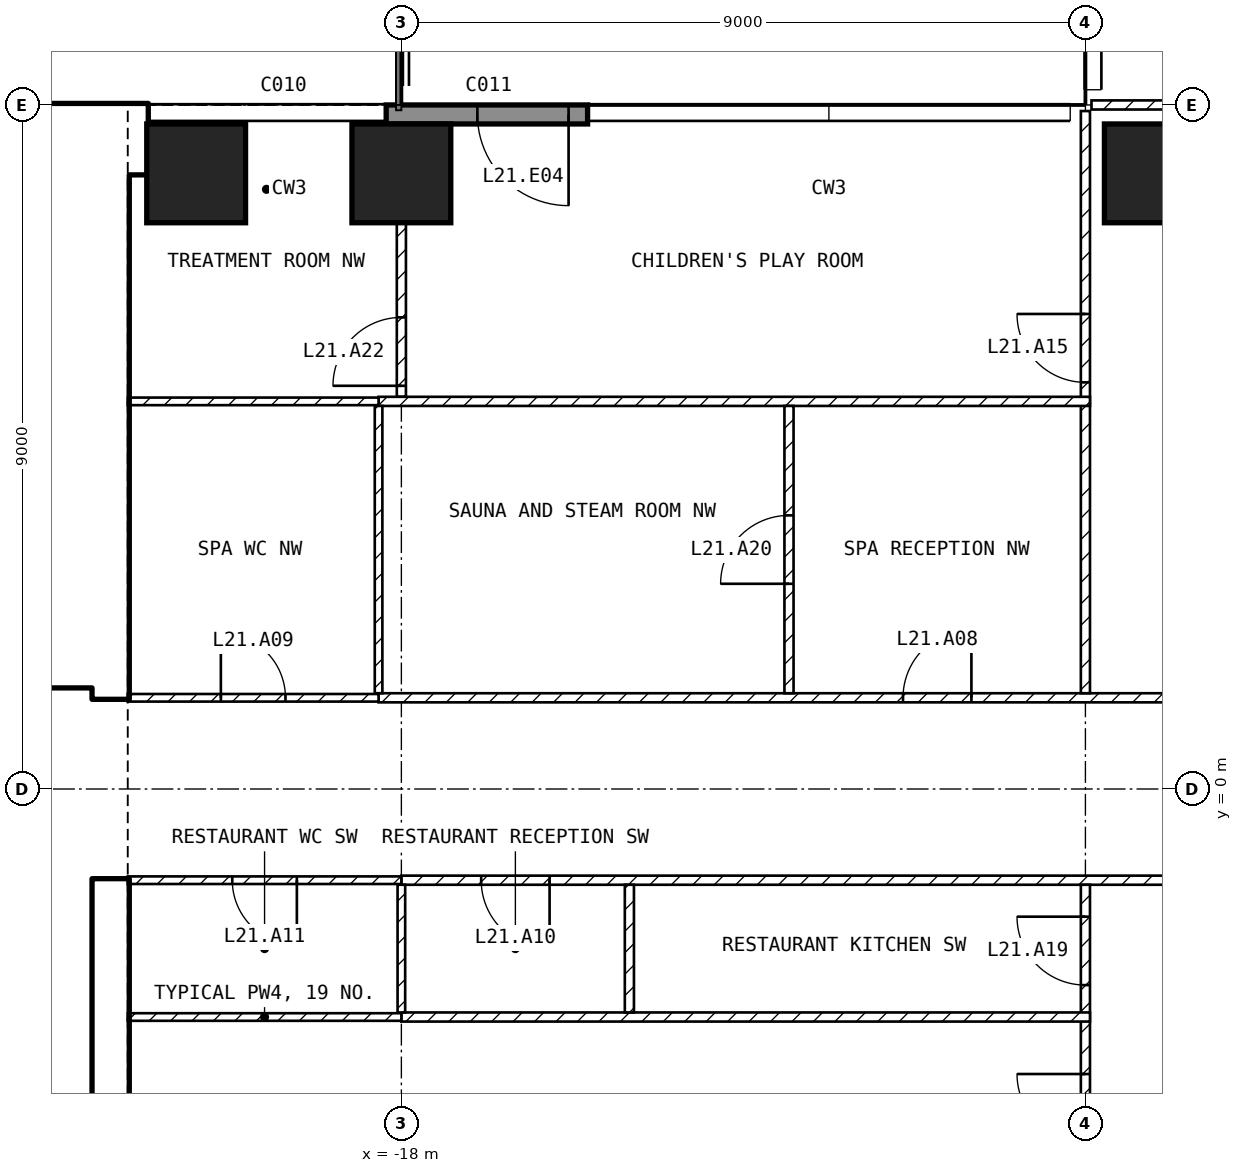
"""IFC4 building model, lengths in metres.
Left out: names, types, materials, properties, quantities, classifications, styles, units other than length and angle.
Written with IfcOpenShell. Run it as: python <this file> out.ifc"""

import sys

from ifc_helpers import new_model, si_unit, direction, frame, frame_2d, origin, origin_2d, place, context, subcontext, project, spatial, rectangle, extrude, element, fill, save


model = new_model("IFC4")
c1 = context("Model", 3, precision=1e-05, world=origin(), true_north=direction((0.0, 1.0)))
c2 = subcontext(c1, "Body", "Model", "MODEL_VIEW")
j1 = project(units=[si_unit("LENGTHUNIT", "METRE"), si_unit("PLANEANGLEUNIT", "RADIAN")], contexts=[c1])
p1 = place(None, origin())
s1 = spatial("IfcSite", under=j1, at=p1, CompositionType="ELEMENT")
p2 = place(p1, origin())
s2 = spatial("IfcBuilding", under=s1, at=p2, CompositionType="ELEMENT")
p3 = place(p2, frame((0.0, 0.0, 92.5)))
s3 = spatial("IfcBuildingStorey", under=s2, at=p3, CompositionType="ELEMENT", Elevation=92.5)
for number, where, z_axis, x_axis in (
    (1, (-20.7, 8.1, -0.3), (0.0, 0.0, 1.0), (1.0, 0.0, 0.0)),
    (2, (-18.0, 8.1, -0.3), (0.0, 0.0, 1.0), (1.0, 0.0, 0.0)),
    (3, (-8.1, 8.1, -0.3), (0.0, 0.0, 1.0), (1.0, 0.0, 0.0)),
):
    element("IfcColumn", number, at=place(p3, frame(where, z_axis=z_axis, x_axis=x_axis)), inside=s3, PredefinedType="COLUMN", context=c2, shape_type="SweptSolid", body=[
        extrude(rectangle(XDim=1.3, YDim=1.3, at=origin_2d()), origin(), (0.0, 0.0, 1.0), 5.25),
    ])
p4 = place(p3, frame((-15.55, 8.875, 0.0), z_axis=(0.0, 0.0, 1.0), x_axis=(-1.0, 0.0, 0.0)))
e4 = element("IfcWall", 4, at=p4, inside=s3, PredefinedType="SOLIDWALL", context=c2, shape_type="SweptSolid", body=[
    extrude(rectangle(XDim=2.65, YDim=0.25, at=frame_2d((1.325, 0.0))), origin(), (0.0, 0.0, 1.0), 4.95),
])
p5 = place(p4, frame((0.25, 0.0, 0.0)))
e5 = element("IfcOpeningElement", 5, at=p5, cuts=e4, PredefinedType="OPENING", context=c2, shape_type="SweptSolid", body=[
    extrude(rectangle(XDim=1.2, YDim=2.4, at=frame_2d((0.6, 1.2))), frame((0.0, 0.135, 0.0), z_axis=(0.0, -1.0, 0.0), x_axis=(1.0, 0.0, 0.0)), (0.0, 0.0, 1.0), 0.27),
])
p6 = place(p3, frame((-31.5, 8.55, 0.0), z_axis=(0.0, 0.0, 1.0), x_axis=(1.0, 0.0, 0.0)))
e6 = element("IfcWall", 6, at=p6, inside=s3, PredefinedType="SHEAR", context=c2, shape_type="SweptSolid", body=[
    extrude(rectangle(XDim=10.15, YDim=0.9, at=frame_2d((5.075, 0.0))), origin(), (0.0, 0.0, 1.0), 4.95),
])
for number, where, z_axis, x_axis in (
    (7, (-21.825, -8.1, 0.0), (0.0, 0.0, 1.0), (0.0, 1.0, 0.0)),
    (8, (-21.825, 1.2, 0.0), (0.0, 0.0, 1.0), (0.0, 1.0, 0.0)),
):
    element("IfcWall", number, at=place(p3, frame(where, z_axis=z_axis, x_axis=x_axis)), inside=s3, PredefinedType="SHEAR", context=c2, shape_type="SweptSolid", body=[
        extrude(rectangle(XDim=6.9, YDim=0.45, at=frame_2d((3.45, 0.0))), origin(), (0.0, 0.0, 1.0), 4.95),
    ])
p7 = place(p3, frame((-35.1, 1.45, 0.0), z_axis=(0.0, 0.0, 1.0), x_axis=(1.0, 0.0, 0.0)))
e9 = element("IfcWall", 9, at=p7, inside=s3, PredefinedType="SOLIDWALL", context=c2, shape_type="SweptSolid", body=[
    extrude(rectangle(XDim=13.05, YDim=0.2, at=frame_2d((6.525, 0.0))), origin(), (0.0, 0.0, 1.0), 4.95),
])
p8 = place(p7, frame((3.45, 0.0, 0.0)))
e10 = element("IfcOpeningElement", 10, at=p8, cuts=e9, PredefinedType="OPENING", context=c2, shape_type="SweptSolid", body=[
    extrude(rectangle(XDim=1.0, YDim=2.1, at=frame_2d((0.5, 1.05))), frame((0.0, 0.11, 0.0), z_axis=(0.0, -1.0, 0.0), x_axis=(1.0, 0.0, 0.0)), (0.0, 0.0, 1.0), 0.22),
])
p9 = place(p7, frame((0.95, 0.0, 0.0)))
e11 = element("IfcOpeningElement", 11, at=p9, cuts=e9, PredefinedType="OPENING", context=c2, shape_type="SweptSolid", body=[
    extrude(rectangle(XDim=1.0, YDim=2.1, at=frame_2d((0.5, 1.05))), frame((0.0, 0.11, 0.0), z_axis=(0.0, -1.0, 0.0), x_axis=(1.0, 0.0, 0.0)), (0.0, 0.0, 1.0), 0.22),
])
p10 = place(p7, frame((11.3, 0.0, 0.0)))
e12 = element("IfcOpeningElement", 12, at=p10, cuts=e9, PredefinedType="OPENING", context=c2, shape_type="SweptSolid", body=[
    extrude(rectangle(XDim=1.0, YDim=2.1, at=frame_2d((0.5, 1.05))), frame((0.0, 0.11, 0.0), z_axis=(0.0, -1.0, 0.0), x_axis=(1.0, 0.0, 0.0)), (0.0, 0.0, 1.0), 0.22),
])
p11 = place(p7, frame((8.8, 0.0, 0.0)))
e13 = element("IfcOpeningElement", 13, at=p11, cuts=e9, PredefinedType="OPENING", context=c2, shape_type="SweptSolid", body=[
    extrude(rectangle(XDim=1.0, YDim=2.1, at=frame_2d((0.5, 1.05))), frame((0.0, 0.11, 0.0), z_axis=(0.0, -1.0, 0.0), x_axis=(1.0, 0.0, 0.0)), (0.0, 0.0, 1.0), 0.22),
])
p12 = place(p3, frame((-28.35, 5.15, 0.0), z_axis=(0.0, 0.0, 1.0), x_axis=(1.0, 0.0, 0.0)))
e14 = element("IfcWall", 14, at=p12, inside=s3, PredefinedType="SOLIDWALL", context=c2, shape_type="SweptSolid", body=[
    extrude(rectangle(XDim=6.3, YDim=0.2, at=frame_2d((3.15, 0.0))), origin(), (0.0, 0.0, 1.0), 4.95),
])
p13 = place(p12, frame((5.1, 0.0, 0.0)))
e15 = element("IfcOpeningElement", 15, at=p13, cuts=e14, PredefinedType="OPENING", context=c2, shape_type="SweptSolid", body=[
    extrude(rectangle(XDim=1.0, YDim=2.1, at=frame_2d((0.5, 1.05))), frame((0.0, 0.11, 0.0), z_axis=(0.0, -1.0, 0.0), x_axis=(1.0, 0.0, 0.0)), (0.0, 0.0, 1.0), 0.22),
])
p14 = place(p3, frame((-18.3, 1.2, 0.0), z_axis=(0.0, 0.0, 1.0), x_axis=(1.0, 0.0, 0.0)))
e16 = element("IfcWall", 16, at=p14, inside=s3, PredefinedType="PARTITIONING", context=c2, shape_type="SweptSolid", body=[
    extrude(rectangle(XDim=32.7, YDim=0.12, at=frame_2d((16.35, 0.0))), origin(), (0.0, 0.0, 1.0), 4.95),
])
p15 = place(p14, frame((11.55, 0.0, 0.0)))
e17 = element("IfcOpeningElement", 17, at=p15, cuts=e16, PredefinedType="OPENING", context=c2, shape_type="SweptSolid", body=[
    extrude(rectangle(XDim=1.8, YDim=2.1, at=frame_2d((0.9, 1.05))), frame((0.0, 0.07, 0.0), z_axis=(0.0, -1.0, 0.0), x_axis=(1.0, 0.0, 0.0)), (0.0, 0.0, 1.0), 0.14),
])
p16 = place(p14, frame((20.55, 0.0, 0.0)))
e18 = element("IfcOpeningElement", 18, at=p16, cuts=e16, PredefinedType="OPENING", context=c2, shape_type="SweptSolid", body=[
    extrude(rectangle(XDim=1.8, YDim=2.1, at=frame_2d((0.9, 1.05))), frame((0.0, 0.07, 0.0), z_axis=(0.0, -1.0, 0.0), x_axis=(1.0, 0.0, 0.0)), (0.0, 0.0, 1.0), 0.14),
])
p17 = place(p14, frame((28.35, 0.0, 0.0)))
e19 = element("IfcOpeningElement", 19, at=p17, cuts=e16, PredefinedType="OPENING", context=c2, shape_type="SweptSolid", body=[
    extrude(rectangle(XDim=0.9, YDim=2.1, at=frame_2d((0.45, 1.05))), frame((0.0, 0.07, 0.0), z_axis=(0.0, -1.0, 0.0), x_axis=(1.0, 0.0, 0.0)), (0.0, 0.0, 1.0), 0.14),
])
p18 = place(p14, frame((6.9, 0.0, 0.0)))
e20 = element("IfcOpeningElement", 20, at=p18, cuts=e16, PredefinedType="OPENING", context=c2, shape_type="SweptSolid", body=[
    extrude(rectangle(XDim=0.9, YDim=2.1, at=frame_2d((0.45, 1.05))), frame((0.0, 0.07, 0.0), z_axis=(0.0, -1.0, 0.0), x_axis=(1.0, 0.0, 0.0)), (0.0, 0.0, 1.0), 0.14),
])
p19 = place(p3, frame((18.0, -1.2, 0.0), z_axis=(0.0, 0.0, 1.0), x_axis=(-1.0, 0.0, 0.0)))
e21 = element("IfcWall", 21, at=p19, inside=s3, PredefinedType="PARTITIONING", context=c2, shape_type="SweptSolid", body=[
    extrude(rectangle(XDim=36.0, YDim=0.12, at=frame_2d((18.0, 0.0))), origin(), (0.0, 0.0, 1.0), 4.95),
])
p20 = place(p19, frame((17.1, 0.0, 0.0)))
e22 = element("IfcOpeningElement", 22, at=p20, cuts=e21, PredefinedType="OPENING", context=c2, shape_type="SweptSolid", body=[
    extrude(rectangle(XDim=1.8, YDim=2.1, at=frame_2d((0.9, 1.05))), frame((0.0, 0.07, 0.0), z_axis=(0.0, -1.0, 0.0), x_axis=(1.0, 0.0, 0.0)), (0.0, 0.0, 1.0), 0.14),
])
p21 = place(p19, frame((5.25, 0.0, 0.0)))
e23 = element("IfcOpeningElement", 23, at=p21, cuts=e21, PredefinedType="OPENING", context=c2, shape_type="SweptSolid", body=[
    extrude(rectangle(XDim=0.9, YDim=2.1, at=frame_2d((0.45, 1.05))), frame((0.0, 0.07, 0.0), z_axis=(0.0, -1.0, 0.0), x_axis=(1.0, 0.0, 0.0)), (0.0, 0.0, 1.0), 0.14),
])
p22 = place(p19, frame((34.05, 0.0, 0.0)))
e24 = element("IfcOpeningElement", 24, at=p22, cuts=e21, PredefinedType="OPENING", context=c2, shape_type="SweptSolid", body=[
    extrude(rectangle(XDim=0.9, YDim=2.1, at=frame_2d((0.45, 1.05))), frame((0.0, 0.07, 0.0), z_axis=(0.0, -1.0, 0.0), x_axis=(1.0, 0.0, 0.0)), (0.0, 0.0, 1.0), 0.14),
])
p23 = place(p3, frame((-21.6, 1.2, 0.0), z_axis=(0.0, 0.0, 1.0), x_axis=(1.0, 0.0, 0.0)))
e25 = element("IfcWall", 25, at=p23, inside=s3, PredefinedType="PARTITIONING", context=c2, shape_type="SweptSolid", body=[
    extrude(rectangle(XDim=3.3, YDim=0.1, at=frame_2d((1.65, 0.0))), origin(), (0.0, 0.0, 1.0), 4.95),
])
p24 = place(p23, frame((1.225, 0.0, 0.0)))
e26 = element("IfcOpeningElement", 26, at=p24, cuts=e25, PredefinedType="OPENING", context=c2, shape_type="SweptSolid", body=[
    extrude(rectangle(XDim=0.85, YDim=2.1, at=frame_2d((0.425, 1.05))), frame((0.0, 0.06, 0.0), z_axis=(0.0, -1.0, 0.0), x_axis=(1.0, 0.0, 0.0)), (0.0, 0.0, 1.0), 0.12),
])
p25 = place(p3, frame((-18.0, -1.2, 0.0), z_axis=(0.0, 0.0, 1.0), x_axis=(-1.0, 0.0, 0.0)))
e27 = element("IfcWall", 27, at=p25, inside=s3, PredefinedType="PARTITIONING", context=c2, shape_type="SweptSolid", body=[
    extrude(rectangle(XDim=3.6, YDim=0.1, at=frame_2d((1.8, 0.0))), origin(), (0.0, 0.0, 1.0), 4.95),
])
p26 = place(p25, frame((1.375, 0.0, 0.0)))
e28 = element("IfcOpeningElement", 28, at=p26, cuts=e27, PredefinedType="OPENING", context=c2, shape_type="SweptSolid", body=[
    extrude(rectangle(XDim=0.85, YDim=2.1, at=frame_2d((0.425, 1.05))), frame((0.0, 0.06, 0.0), z_axis=(0.0, -1.0, 0.0), x_axis=(1.0, 0.0, 0.0)), (0.0, 0.0, 1.0), 0.12),
])
p27 = place(p3, frame((-9.0, 1.26, 0.0), z_axis=(0.0, 0.0, 1.0), x_axis=(0.0, 1.0, 0.0)))
e29 = element("IfcWall", 29, at=p27, inside=s3, PredefinedType="PARTITIONING", context=c2, shape_type="SweptSolid", body=[
    extrude(rectangle(XDim=7.66, YDim=0.12, at=frame_2d((3.83, 0.0))), origin(), (0.0, 0.0, 1.0), 4.95),
])
p28 = place(p27, frame((4.09, 0.0, 0.0)))
e30 = element("IfcOpeningElement", 30, at=p28, cuts=e29, PredefinedType="OPENING", context=c2, shape_type="SweptSolid", body=[
    extrude(rectangle(XDim=0.9, YDim=2.1, at=frame_2d((0.45, 1.05))), frame((0.0, 0.07, 0.0), z_axis=(0.0, -1.0, 0.0), x_axis=(1.0, 0.0, 0.0)), (0.0, 0.0, 1.0), 0.14),
])
p29 = place(p3, frame((-8.92, 9.0, 0.0), z_axis=(0.0, 0.0, 1.0), x_axis=(1.0, 0.0, 0.0)))
e31 = element("IfcWall", 31, at=p29, inside=s3, PredefinedType="PARTITIONING", context=c2, shape_type="SweptSolid", body=[
    extrude(rectangle(XDim=11.02, YDim=0.12, at=frame_2d((5.51, 0.0))), origin(), (0.0, 0.0, 1.0), 4.95),
])
p30 = place(p29, frame((8.02, 0.0, 0.0)))
e32 = element("IfcOpeningElement", 32, at=p30, cuts=e31, PredefinedType="OPENING", context=c2, shape_type="SweptSolid", body=[
    extrude(rectangle(XDim=1.8, YDim=2.1, at=frame_2d((0.9, 1.05))), frame((0.0, 0.07, 0.0), z_axis=(0.0, -1.0, 0.0), x_axis=(1.0, 0.0, 0.0)), (0.0, 0.0, 1.0), 0.14),
])
p31 = place(p3, frame((-9.0, -8.92, 0.0), z_axis=(0.0, 0.0, 1.0), x_axis=(0.0, 1.0, 0.0)))
e33 = element("IfcWall", 33, at=p31, inside=s3, PredefinedType="PARTITIONING", context=c2, shape_type="SweptSolid", body=[
    extrude(rectangle(XDim=7.66, YDim=0.12, at=frame_2d((3.83, 0.0))), origin(), (0.0, 0.0, 1.0), 4.95),
])
p32 = place(p31, frame((4.27, 0.0, 0.0)))
e34 = element("IfcOpeningElement", 34, at=p32, cuts=e33, PredefinedType="OPENING", context=c2, shape_type="SweptSolid", body=[
    extrude(rectangle(XDim=0.9, YDim=2.1, at=frame_2d((0.45, 1.05))), frame((0.0, 0.07, 0.0), z_axis=(0.0, -1.0, 0.0), x_axis=(1.0, 0.0, 0.0)), (0.0, 0.0, 1.0), 0.14),
])
p33 = place(p31, frame((6.34, 0.0, 0.0)))
e35 = element("IfcOpeningElement", 35, at=p33, cuts=e33, PredefinedType="OPENING", context=c2, shape_type="SweptSolid", body=[
    extrude(rectangle(XDim=0.9, YDim=2.1, at=frame_2d((0.45, 1.05))), frame((0.0, 0.07, 0.0), z_axis=(0.0, -1.0, 0.0), x_axis=(1.0, 0.0, 0.0)), (0.0, 0.0, 1.0), 0.14),
])
p34 = place(p3, frame((-18.0, 5.16, 0.0), z_axis=(0.0, 0.0, 1.0), x_axis=(0.0, 1.0, 0.0)))
e36 = element("IfcWall", 36, at=p34, inside=s3, PredefinedType="PARTITIONING", context=c2, shape_type="SweptSolid", body=[
    extrude(rectangle(XDim=2.29, YDim=0.12, at=frame_2d((1.145, 0.0))), origin(), (0.0, 0.0, 1.0), 4.046),
])
p35 = place(p34, frame((0.145, 0.0, 0.0)))
e37 = element("IfcOpeningElement", 37, at=p35, cuts=e36, PredefinedType="OPENING", context=c2, shape_type="SweptSolid", body=[
    extrude(rectangle(XDim=0.9, YDim=2.1, at=frame_2d((0.45, 1.05))), frame((0.0, 0.07, 0.0), z_axis=(0.0, -1.0, 0.0), x_axis=(1.0, 0.0, 0.0)), (0.0, 0.0, 1.0), 0.14),
])
p36 = place(p3, frame((-8.94, 5.1, 0.0), z_axis=(0.0, 0.0, 1.0), x_axis=(-1.0, 0.0, 0.0)))
e38 = element("IfcWall", 38, at=p36, inside=s3, PredefinedType="PARTITIONING", context=c2, shape_type="SweptSolid", body=[
    extrude(rectangle(XDim=9.36, YDim=0.12, at=frame_2d((4.68, 0.0))), origin(), (0.0, 0.0, 1.0), 4.95),
])
p37 = place(p3, frame((-18.3, 5.1, 0.0), z_axis=(0.0, 0.0, 1.0), x_axis=(-1.0, 0.0, 0.0)))
e39 = element("IfcWall", 39, at=p37, inside=s3, PredefinedType="PARTITIONING", context=c2, shape_type="SweptSolid", body=[
    extrude(rectangle(XDim=3.3, YDim=0.1, at=frame_2d((1.65, 0.0))), origin(), (0.0, 0.0, 1.0), 4.95),
])
p38 = place(p3, frame((-12.9, 1.26, 0.0), z_axis=(0.0, 0.0, 1.0), x_axis=(0.0, 1.0, 0.0)))
e40 = element("IfcWall", 40, at=p38, inside=s3, PredefinedType="PARTITIONING", context=c2, shape_type="SweptSolid", body=[
    extrude(rectangle(XDim=3.78, YDim=0.12, at=frame_2d((1.89, 0.0))), origin(), (0.0, 0.0, 1.0), 4.338),
])
p39 = place(p38, frame((1.44, 0.0, 0.0)))
e41 = element("IfcOpeningElement", 41, at=p39, cuts=e40, PredefinedType="OPENING", context=c2, shape_type="SweptSolid", body=[
    extrude(rectangle(XDim=0.9, YDim=2.1, at=frame_2d((0.45, 1.05))), frame((0.0, 0.07, 0.0), z_axis=(0.0, -1.0, 0.0), x_axis=(1.0, 0.0, 0.0)), (0.0, 0.0, 1.0), 0.14),
])
p40 = place(p3, frame((-18.3, 1.26, 0.0), z_axis=(0.0, 0.0, 1.0), x_axis=(0.0, 1.0, 0.0)))
e42 = element("IfcWall", 42, at=p40, inside=s3, PredefinedType="PARTITIONING", context=c2, shape_type="SweptSolid", body=[
    extrude(rectangle(XDim=3.78, YDim=0.1, at=frame_2d((1.89, 0.0))), origin(), (0.0, 0.0, 1.0), 4.95),
])
p41 = place(p3, frame((-18.0, -3.0, 0.0), z_axis=(0.0, 0.0, 1.0), x_axis=(1.0, 0.0, 0.0)))
e43 = element("IfcWall", 43, at=p41, inside=s3, PredefinedType="PARTITIONING", context=c2, shape_type="SweptSolid", body=[
    extrude(rectangle(XDim=9.06, YDim=0.12, at=frame_2d((4.53, 0.0))), origin(), (0.0, 0.0, 1.0), 4.95),
])
p42 = place(p3, frame((-21.6, -3.0, 0.0), z_axis=(0.0, 0.0, 1.0), x_axis=(1.0, 0.0, 0.0)))
e44 = element("IfcWall", 44, at=p42, inside=s3, PredefinedType="PARTITIONING", context=c2, shape_type="SweptSolid", body=[
    extrude(rectangle(XDim=3.6, YDim=0.1, at=frame_2d((1.8, 0.0))), origin(), (0.0, 0.0, 1.0), 4.95),
])
p43 = place(p3, frame((-15.0, -2.94, 0.0), z_axis=(0.0, 0.0, 1.0), x_axis=(0.0, 1.0, 0.0)))
e45 = element("IfcWall", 45, at=p43, inside=s3, PredefinedType="PARTITIONING", context=c2, shape_type="SweptSolid", body=[
    extrude(rectangle(XDim=1.68, YDim=0.12, at=frame_2d((0.84, 0.0))), origin(), (0.0, 0.0, 1.0), 4.95),
])
p44 = place(p3, frame((-18.0, -2.94, 0.0), z_axis=(0.0, 0.0, 1.0), x_axis=(0.0, 1.0, 0.0)))
e46 = element("IfcWall", 46, at=p44, inside=s3, PredefinedType="PARTITIONING", context=c2, shape_type="SweptSolid", body=[
    extrude(rectangle(XDim=1.68, YDim=0.1, at=frame_2d((0.84, 0.0))), origin(), (0.0, 0.0, 1.0), 4.046),
])
p45 = place(p5, origin())
e47 = element("IfcDoor", 47, at=p45, inside=s3, OperationType="SINGLE_SWING_LEFT", PredefinedType="DOOR", context=c2, shape_type="SweptSolid", body=[
    extrude(rectangle(XDim=1.2, YDim=2.4, at=frame_2d((0.6, 1.2))), frame((0.0, 0.025, 0.0), z_axis=(0.0, -1.0, 0.0), x_axis=(1.0, 0.0, 0.0)), (0.0, 0.0, 1.0), 0.05),
])
fill(e5, e47)
p46 = place(p13, origin())
e48 = element("IfcDoor", 48, at=p46, inside=s3, OperationType="SINGLE_SWING_LEFT", PredefinedType="DOOR", context=c2, shape_type="SweptSolid", body=[
    extrude(rectangle(XDim=1.0, YDim=2.1, at=frame_2d((0.5, 1.05))), frame((0.0, 0.025, 0.0), z_axis=(0.0, -1.0, 0.0), x_axis=(1.0, 0.0, 0.0)), (0.0, 0.0, 1.0), 0.05),
])
fill(e15, e48)
p47 = place(p18, origin())
e49 = element("IfcDoor", 49, at=p47, inside=s3, OperationType="SINGLE_SWING_RIGHT", PredefinedType="DOOR", context=c2, shape_type="SweptSolid", body=[
    extrude(rectangle(XDim=0.9, YDim=2.1, at=frame_2d((0.45, 1.05))), frame((0.0, 0.025, 0.0), z_axis=(0.0, -1.0, 0.0), x_axis=(1.0, 0.0, 0.0)), (0.0, 0.0, 1.0), 0.05),
])
fill(e20, e49)
p48 = place(p24, origin())
e50 = element("IfcDoor", 50, at=p48, inside=s3, OperationType="SINGLE_SWING_LEFT", PredefinedType="DOOR", context=c2, shape_type="SweptSolid", body=[
    extrude(rectangle(XDim=0.85, YDim=2.1, at=frame_2d((0.425, 1.05))), frame((0.0, 0.025, 0.0), z_axis=(0.0, -1.0, 0.0), x_axis=(1.0, 0.0, 0.0)), (0.0, 0.0, 1.0), 0.05),
])
fill(e26, e50)
p49 = place(p22, origin())
e51 = element("IfcDoor", 51, at=p49, inside=s3, OperationType="SINGLE_SWING_LEFT", PredefinedType="DOOR", context=c2, shape_type="SweptSolid", body=[
    extrude(rectangle(XDim=0.9, YDim=2.1, at=frame_2d((0.45, 1.05))), frame((0.0, 0.025, 0.0), z_axis=(0.0, -1.0, 0.0), x_axis=(1.0, 0.0, 0.0)), (0.0, 0.0, 1.0), 0.05),
])
fill(e24, e51)
p50 = place(p26, origin())
e52 = element("IfcDoor", 52, at=p50, inside=s3, OperationType="SINGLE_SWING_LEFT", PredefinedType="DOOR", context=c2, shape_type="SweptSolid", body=[
    extrude(rectangle(XDim=0.85, YDim=2.1, at=frame_2d((0.425, 1.05))), frame((0.0, 0.025, 0.0), z_axis=(0.0, -1.0, 0.0), x_axis=(1.0, 0.0, 0.0)), (0.0, 0.0, 1.0), 0.05),
])
fill(e28, e52)
p51 = place(p28, origin())
e53 = element("IfcDoor", 53, at=p51, inside=s3, OperationType="SINGLE_SWING_RIGHT", PredefinedType="DOOR", context=c2, shape_type="SweptSolid", body=[
    extrude(rectangle(XDim=0.9, YDim=2.1, at=frame_2d((0.45, 1.05))), frame((0.0, 0.025, 0.0), z_axis=(0.0, -1.0, 0.0), x_axis=(1.0, 0.0, 0.0)), (0.0, 0.0, 1.0), 0.05),
])
fill(e30, e53)
p52 = place(p32, origin())
e54 = element("IfcDoor", 54, at=p52, inside=s3, OperationType="SINGLE_SWING_RIGHT", PredefinedType="DOOR", context=c2, shape_type="SweptSolid", body=[
    extrude(rectangle(XDim=0.9, YDim=2.1, at=frame_2d((0.45, 1.05))), frame((0.0, 0.025, 0.0), z_axis=(0.0, -1.0, 0.0), x_axis=(1.0, 0.0, 0.0)), (0.0, 0.0, 1.0), 0.05),
])
fill(e34, e54)
p53 = place(p33, origin())
e55 = element("IfcDoor", 55, at=p53, inside=s3, OperationType="SINGLE_SWING_RIGHT", PredefinedType="DOOR", context=c2, shape_type="SweptSolid", body=[
    extrude(rectangle(XDim=0.9, YDim=2.1, at=frame_2d((0.45, 1.05))), frame((0.0, 0.025, 0.0), z_axis=(0.0, -1.0, 0.0), x_axis=(1.0, 0.0, 0.0)), (0.0, 0.0, 1.0), 0.05),
])
fill(e35, e55)
p54 = place(p39, origin())
e56 = element("IfcDoor", 56, at=p54, inside=s3, OperationType="SINGLE_SWING_LEFT", PredefinedType="DOOR", context=c2, shape_type="SweptSolid", body=[
    extrude(rectangle(XDim=0.9, YDim=2.1, at=frame_2d((0.45, 1.05))), frame((0.0, 0.025, 0.0), z_axis=(0.0, -1.0, 0.0), x_axis=(1.0, 0.0, 0.0)), (0.0, 0.0, 1.0), 0.05),
])
fill(e41, e56)
p55 = place(p35, origin())
e57 = element("IfcDoor", 57, at=p55, inside=s3, OperationType="SINGLE_SWING_LEFT", PredefinedType="DOOR", context=c2, shape_type="SweptSolid", body=[
    extrude(rectangle(XDim=0.9, YDim=2.1, at=frame_2d((0.45, 1.05))), frame((0.0, 0.025, 0.0), z_axis=(0.0, -1.0, 0.0), x_axis=(1.0, 0.0, 0.0)), (0.0, 0.0, 1.0), 0.05),
])
fill(e37, e57)
save(model, sys.argv[1])
